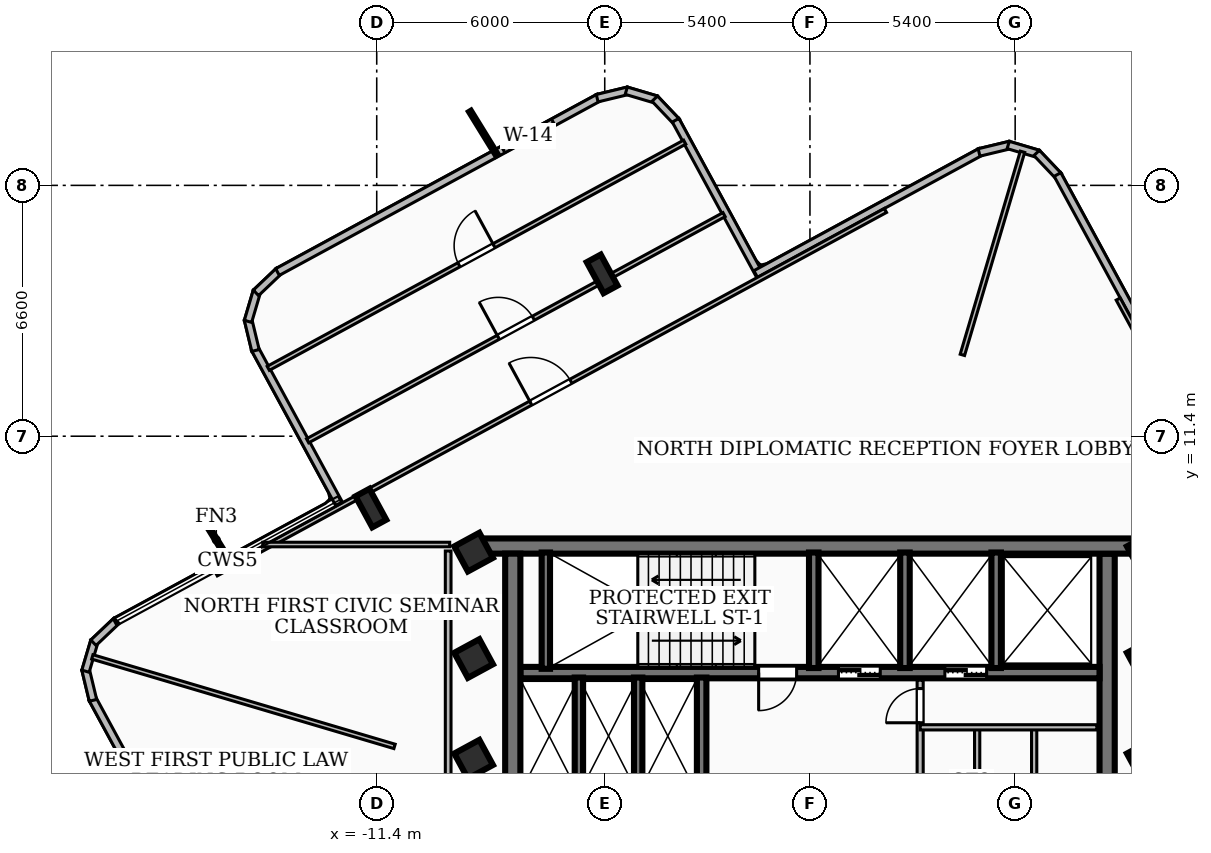
"""IFC4 building model, lengths in metres.
Left out: names, types, materials, properties, quantities, classifications, styles, units other than length and angle.
Written with IfcOpenShell. Run it as: python <this file> out.ifc"""

import sys

from ifc_helpers import new_model, si_unit, direction, frame, frame_2d, origin, origin_2d, place, context, subcontext, project, spatial, rectangle, i_section, extrude, element, fill, save


model = new_model("IFC4")
c1 = context("Model", 3, precision=1e-05, world=origin(), true_north=direction((0.0, 1.0)))
c2 = subcontext(c1, "Body", "Model", "MODEL_VIEW")
j1 = project(units=[si_unit("LENGTHUNIT", "METRE"), si_unit("PLANEANGLEUNIT", "RADIAN")], contexts=[c1])
p1 = place(None, origin())
s1 = spatial("IfcSite", under=j1, at=p1, CompositionType="ELEMENT")
p2 = place(p1, origin())
s2 = spatial("IfcBuilding", under=s1, at=p2, CompositionType="ELEMENT")
p3 = place(p2, frame((0.0, 0.0, 200.88)))
s3 = spatial("IfcBuildingStorey", under=s2, at=p3, CompositionType="ELEMENT", Elevation=200.88)
p4 = place(p3, frame((-8.78, 8.51, 0.0), z_axis=(0.0, 0.0, 1.0), x_axis=(1.0, 0.0, 0.0)))
e1 = element("IfcWall", 1, at=p4, inside=s3, PredefinedType="SHEAR", context=c2, shape_type="SweptSolid", body=[
    extrude(rectangle(XDim=17.56, YDim=0.4, at=frame_2d((8.78, 0.0))), origin(), (0.0, 0.0, 1.0), 4.06),
])
for number, where, z_axis, x_axis in (
    (2, (-7.82, 1.95, 0.0), (0.0, 0.0, 1.0), (0.0, 1.0, 0.0)),
    (3, (7.82, 8.31, 0.0), (0.0, 0.0, 1.0), (0.0, -1.0, 0.0)),
):
    element("IfcWall", number, at=place(p3, frame(where, z_axis=z_axis, x_axis=x_axis)), inside=s3, PredefinedType="SHEAR", context=c2, shape_type="SweptSolid", body=[
        extrude(rectangle(XDim=6.36, YDim=0.4, at=frame_2d((3.18, 0.0))), origin(), (0.0, 0.0, 1.0), 4.06),
    ])
p5 = place(p3, frame((7.62, 5.18, 0.0), z_axis=(0.0, 0.0, 1.0), x_axis=(-1.0, 0.0, 0.0)))
e4 = element("IfcWall", 4, at=p5, inside=s3, PredefinedType="SOLIDWALL", context=c2, shape_type="SweptSolid", body=[
    extrude(rectangle(XDim=15.24, YDim=0.3, at=frame_2d((7.62, 0.0))), origin(), (0.0, 0.0, 1.0), 4.06),
])
p6 = place(p5, frame((5.77, 0.0, 0.0)))
e5 = element("IfcOpeningElement", 5, at=p6, cuts=e4, PredefinedType="OPENING", context=c2, shape_type="SweptSolid", body=[
    extrude(rectangle(XDim=1.1, YDim=2.15, at=frame_2d((0.55, 1.075))), frame((0.0, 0.16, 0.0), z_axis=(0.0, -1.0, 0.0), x_axis=(1.0, 0.0, 0.0)), (0.0, 0.0, 1.0), 0.32),
])
p7 = place(p5, frame((2.97, 0.0, 0.0)))
e6 = element("IfcOpeningElement", 6, at=p7, cuts=e4, PredefinedType="OPENING", context=c2, shape_type="SweptSolid", body=[
    extrude(rectangle(XDim=1.1, YDim=2.15, at=frame_2d((0.55, 1.075))), frame((0.0, 0.16, 0.0), z_axis=(0.0, -1.0, 0.0), x_axis=(1.0, 0.0, 0.0)), (0.0, 0.0, 1.0), 0.32),
])
p8 = place(p5, frame((7.97, 0.0, 0.0)))
e7 = element("IfcOpeningElement", 7, at=p8, cuts=e4, PredefinedType="OPENING", context=c2, shape_type="SweptSolid", body=[
    extrude(rectangle(XDim=1.0, YDim=2.1, at=frame_2d((0.5, 1.05))), frame((0.0, 0.16, 0.0), z_axis=(0.0, -1.0, 0.0), x_axis=(1.0, 0.0, 0.0)), (0.0, 0.0, 1.0), 0.32),
])
p9 = place(p3, frame((-6.95, 5.28, 0.0), z_axis=(0.0, 0.0, 1.0), x_axis=(0.0, 1.0, 0.0)))
e8 = element("IfcWall", 8, at=p9, inside=s3, PredefinedType="SOLIDWALL", context=c2, shape_type="SweptSolid", body=[
    extrude(rectangle(XDim=3.06, YDim=0.22, at=frame_2d((1.53, 0.0))), origin(), (0.0, 0.0, 1.0), 4.06),
])
for number, where, z_axis, x_axis in (
    (9, (0.1, 5.3, 0.0), (0.0, 0.0, 1.0), (0.0, 1.0, 0.0)),
    (10, (2.5, 5.3, 0.0), (0.0, 0.0, 1.0), (0.0, 1.0, 0.0)),
    (11, (4.9, 5.3, 0.0), (0.0, 0.0, 1.0), (0.0, 1.0, 0.0)),
):
    element("IfcWall", number, at=place(p3, frame(where, z_axis=z_axis, x_axis=x_axis)), inside=s3, PredefinedType="SOLIDWALL", context=c2, shape_type="SweptSolid", body=[
        extrude(rectangle(XDim=3.04, YDim=0.25, at=frame_2d((1.52, 0.0))), origin(), (0.0, 0.0, 1.0), 4.06),
    ])
p10 = place(p3, frame((-2.85, 1.98, 0.0), z_axis=(0.0, 0.0, 1.0), x_axis=(0.0, 1.0, 0.0)))
e12 = element("IfcWall", 12, at=p10, inside=s3, PredefinedType="SOLIDWALL", context=c2, shape_type="SweptSolid", body=[
    extrude(rectangle(XDim=3.07, YDim=0.25, at=frame_2d((1.535, 0.0))), origin(), (0.0, 0.0, 1.0), 4.06),
])
for number, where, z_axis, x_axis in (
    (13, (-6.08, 1.98, 0.0), (0.0, 0.0, 1.0), (0.0, 1.0, 0.0)),
    (14, (-4.52, 1.98, 0.0), (0.0, 0.0, 1.0), (0.0, 1.0, 0.0)),
):
    element("IfcWall", number, at=place(p3, frame(where, z_axis=z_axis, x_axis=x_axis)), inside=s3, PredefinedType="SOLIDWALL", context=c2, shape_type="SweptSolid", body=[
        extrude(rectangle(XDim=3.07, YDim=0.22, at=frame_2d((1.535, 0.0))), origin(), (0.0, 0.0, 1.0), 4.06),
    ])
for number, where, z_axis, x_axis in (
    (15, (-8.85, 2.9, 0.0), (0.0, 0.0, 1.0), (0.879, 0.477, 0.0)),
    (16, (-8.85, 5.55, 0.0), (0.0, 0.0, 1.0), (0.879, 0.477, 0.0)),
    (17, (8.85, 2.9, 0.0), (0.0, 0.0, 1.0), (0.879, 0.477, 0.0)),
    (18, (8.85, 5.55, 0.0), (0.0, 0.0, 1.0), (0.879, 0.477, 0.0)),
    (19, (-8.85, 8.35, 0.0), (0.0, 0.0, 1.0), (0.879, 0.477, 0.0)),
    (20, (8.85, 8.35, 0.0), (0.0, 0.0, 1.0), (0.879, 0.477, 0.0)),
):
    element("IfcColumn", number, at=place(p3, frame(where, z_axis=z_axis, x_axis=x_axis)), inside=s3, PredefinedType="COLUMN", context=c2, shape_type="SweptSolid", body=[
        extrude(rectangle(XDim=0.75, YDim=0.75, at=origin_2d()), origin(), (0.0, 0.0, 1.0), 4.32),
    ])
for number, where, z_axis, x_axis in (
    (21, (-5.468, 15.671, 0.0), (0.0, 0.0, 1.0), (0.879, 0.477, 0.0)),
    (22, (-11.554, 9.51, 0.0), (0.0, 0.0, 1.0), (0.879, 0.477, 0.0)),
):
    element("IfcColumn", number, at=place(p3, frame(where, z_axis=z_axis, x_axis=x_axis)), inside=s3, PredefinedType="COLUMN", context=c2, shape_type="SweptSolid", body=[
        extrude(i_section(OverallWidth=0.418, OverallDepth=0.927, WebThickness=0.019, FlangeThickness=0.032, at=origin_2d()), origin(), (0.0, 0.0, 1.0), 4.32),
    ])
p11 = place(p3, frame((-6.514, -18.286, 0.0), z_axis=(0.0, 0.0, 1.0), x_axis=(-0.477173953596, 0.878808863183, 0.0)))
e23 = element("IfcWall", 23, at=p11, inside=s3, PredefinedType="SOLIDWALL", context=c2, shape_type="SweptSolid", body=[
    extrude(rectangle(XDim=25.924, YDim=0.2, at=frame_2d((12.962, 0.0))), origin(), (0.0, 0.0, 1.0), 4.06),
])
p12 = place(p11, frame((12.412, 0.0, 0.0)))
e24 = element("IfcOpeningElement", 24, at=p12, cuts=e23, PredefinedType="OPENING", context=c2, shape_type="SweptSolid", body=[
    extrude(rectangle(XDim=1.1, YDim=2.1, at=frame_2d((0.55, 1.05))), frame((0.0, 0.11, 0.0), z_axis=(0.0, -1.0, 0.0), x_axis=(1.0, 0.0, 0.0)), (0.0, 0.0, 1.0), 0.22),
])
p13 = place(p3, frame((-18.866, 4.45, 0.0), z_axis=(0.0, 0.0, 1.0), x_axis=(-0.233890685703, 0.972262900219, 0.0)))
e25 = element("IfcWall", 25, at=p13, inside=s3, PredefinedType="SOLIDWALL", context=c2, shape_type="SweptSolid", body=[
    extrude(rectangle(XDim=0.838, YDim=0.2, at=frame_2d((0.419, 0.0))), origin(), (0.0, 0.0, 1.0), 4.06),
])
p14 = place(p3, frame((-19.063, 5.217, 0.0), z_axis=(0.0, 0.0, 1.0), x_axis=(0.283866368736, 0.958863850972, 0.0)))
e26 = element("IfcWall", 26, at=p14, inside=s3, PredefinedType="SOLIDWALL", context=c2, shape_type="SweptSolid", body=[
    extrude(rectangle(XDim=0.824, YDim=0.2, at=frame_2d((0.412, 0.0))), origin(), (0.0, 0.0, 1.0), 4.06),
])
p15 = place(p3, frame((-18.854, 5.966, 0.0), z_axis=(0.0, 0.0, 1.0), x_axis=(0.725362992084, 0.688366566384, 0.0)))
e27 = element("IfcWall", 27, at=p15, inside=s3, PredefinedType="SOLIDWALL", context=c2, shape_type="SweptSolid", body=[
    extrude(rectangle(XDim=0.838, YDim=0.2, at=frame_2d((0.419, 0.0))), origin(), (0.0, 0.0, 1.0), 4.06),
])
p16 = place(p3, frame((-12.393, 9.623, 0.0), z_axis=(0.0, 0.0, 1.0), x_axis=(-0.47719284897, 0.878798603146, 0.0)))
e28 = element("IfcWall", 28, at=p16, inside=s3, PredefinedType="SOLIDWALL", context=c2, shape_type="SweptSolid", body=[
    extrude(rectangle(XDim=4.641, YDim=0.2, at=frame_2d((2.321, 0.0))), origin(), (0.0, 0.0, 1.0), 4.06),
])
p17 = place(p3, frame((-14.59, 13.656, 0.0), z_axis=(0.0, 0.0, 1.0), x_axis=(-0.233880279999, 0.972265403389, 0.0)))
e29 = element("IfcWall", 29, at=p17, inside=s3, PredefinedType="SOLIDWALL", context=c2, shape_type="SweptSolid", body=[
    extrude(rectangle(XDim=0.837, YDim=0.2, at=frame_2d((0.418, 0.0))), origin(), (0.0, 0.0, 1.0), 4.06),
])
p18 = place(p3, frame((-14.787, 14.422, 0.0), z_axis=(0.0, 0.0, 1.0), x_axis=(0.28389681639, 0.958854836586, 0.0)))
e30 = element("IfcWall", 30, at=p18, inside=s3, PredefinedType="SOLIDWALL", context=c2, shape_type="SweptSolid", body=[
    extrude(rectangle(XDim=0.825, YDim=0.2, at=frame_2d((0.412, 0.0))), origin(), (0.0, 0.0, 1.0), 4.06),
])
p19 = place(p3, frame((-14.578, 15.172, 0.0), z_axis=(0.0, 0.0, 1.0), x_axis=(0.724810143348, 0.688948659988, 0.0)))
e31 = element("IfcWall", 31, at=p19, inside=s3, PredefinedType="SOLIDWALL", context=c2, shape_type="SweptSolid", body=[
    extrude(rectangle(XDim=0.837, YDim=0.2, at=frame_2d((0.419, 0.0))), origin(), (0.0, 0.0, 1.0), 4.06),
])
p20 = place(p3, frame((-14.011, 15.72, 0.0), z_axis=(0.0, 0.0, 1.0), x_axis=(0.878829422659, 0.477136087368, 0.0)))
e32 = element("IfcWall", 32, at=p20, inside=s3, PredefinedType="SOLIDWALL", context=c2, shape_type="SweptSolid", body=[
    extrude(rectangle(XDim=9.624, YDim=0.2, at=frame_2d((4.812, 0.0))), origin(), (0.0, 0.0, 1.0), 4.06),
])
p21 = place(p20, frame((6.757, 0.0, 0.85)))
e33 = element("IfcOpeningElement", 33, at=p21, cuts=e32, PredefinedType="OPENING", context=c2, shape_type="SweptSolid", body=[
    extrude(rectangle(XDim=1.5, YDim=1.5, at=frame_2d((0.75, 0.75))), frame((0.0, 0.11, 0.0), z_axis=(0.0, -1.0, 0.0), x_axis=(1.0, 0.0, 0.0)), (0.0, 0.0, 1.0), 0.22),
])
p22 = place(p3, frame((-5.599, 20.294, 0.0), z_axis=(0.0, 0.0, 1.0), x_axis=(0.972215037407, 0.234089557733, 0.0)))
e34 = element("IfcWall", 34, at=p22, inside=s3, PredefinedType="SOLIDWALL", context=c2, shape_type="SweptSolid", body=[
    extrude(rectangle(XDim=0.837, YDim=0.2, at=frame_2d((0.419, 0.0))), origin(), (0.0, 0.0, 1.0), 4.06),
])
p23 = place(p3, frame((-4.833, 20.491, 0.0), z_axis=(0.0, 0.0, 1.0), x_axis=(0.958959195641, -0.283544107847, 0.0)))
e35 = element("IfcWall", 35, at=p23, inside=s3, PredefinedType="SOLIDWALL", context=c2, shape_type="SweptSolid", body=[
    extrude(rectangle(XDim=0.825, YDim=0.2, at=frame_2d((0.413, 0.0))), origin(), (0.0, 0.0, 1.0), 4.06),
])
p24 = place(p3, frame((-4.083, 20.282, 0.0), z_axis=(0.0, 0.0, 1.0), x_axis=(0.688366566384, -0.725362992084, 0.0)))
e36 = element("IfcWall", 36, at=p24, inside=s3, PredefinedType="SOLIDWALL", context=c2, shape_type="SweptSolid", body=[
    extrude(rectangle(XDim=0.838, YDim=0.2, at=frame_2d((0.419, 0.0))), origin(), (0.0, 0.0, 1.0), 4.06),
])
p25 = place(p3, frame((-3.535, 19.714, 0.0), z_axis=(0.0, 0.0, 1.0), x_axis=(0.477170791431, -0.878810580162, 0.0)))
e37 = element("IfcWall", 37, at=p25, inside=s3, PredefinedType="SOLIDWALL", context=c2, shape_type="SweptSolid", body=[
    extrude(rectangle(XDim=4.642, YDim=0.2, at=frame_2d((2.321, 0.0))), origin(), (0.0, 0.0, 1.0), 4.06),
])
p26 = place(p3, frame((-1.428, 15.667, 0.0), z_axis=(0.0, 0.0, 1.0), x_axis=(0.878784004338, 0.477219733162, 0.0)))
e38 = element("IfcWall", 38, at=p26, inside=s3, PredefinedType="SOLIDWALL", context=c2, shape_type="SweptSolid", body=[
    extrude(rectangle(XDim=6.741, YDim=0.2, at=frame_2d((3.371, 0.0))), origin(), (0.0, 0.0, 1.0), 4.06),
])
p27 = place(p3, frame((4.45, 18.866, 0.0), z_axis=(0.0, 0.0, 1.0), x_axis=(0.972262900219, 0.233890685703, 0.0)))
e39 = element("IfcWall", 39, at=p27, inside=s3, PredefinedType="SOLIDWALL", context=c2, shape_type="SweptSolid", body=[
    extrude(rectangle(XDim=0.838, YDim=0.2, at=frame_2d((0.419, 0.0))), origin(), (0.0, 0.0, 1.0), 4.06),
])
p28 = place(p3, frame((5.217, 19.063, 0.0), z_axis=(0.0, 0.0, 1.0), x_axis=(0.958863850972, -0.283866368736, 0.0)))
e40 = element("IfcWall", 40, at=p28, inside=s3, PredefinedType="SOLIDWALL", context=c2, shape_type="SweptSolid", body=[
    extrude(rectangle(XDim=0.824, YDim=0.2, at=frame_2d((0.412, 0.0))), origin(), (0.0, 0.0, 1.0), 4.06),
])
p29 = place(p3, frame((5.966, 18.854, 0.0), z_axis=(0.0, 0.0, 1.0), x_axis=(0.688366566384, -0.725362992084, 0.0)))
e41 = element("IfcWall", 41, at=p29, inside=s3, PredefinedType="SOLIDWALL", context=c2, shape_type="SweptSolid", body=[
    extrude(rectangle(XDim=0.838, YDim=0.2, at=frame_2d((0.419, 0.0))), origin(), (0.0, 0.0, 1.0), 4.06),
])
p30 = place(p3, frame((6.514, 18.286, 0.0), z_axis=(0.0, 0.0, 1.0), x_axis=(0.477174172682, -0.878808744224, 0.0)))
e42 = element("IfcWall", 42, at=p30, inside=s3, PredefinedType="SOLIDWALL", context=c2, shape_type="SweptSolid", body=[
    extrude(rectangle(XDim=6.742, YDim=0.2, at=frame_2d((3.371, 0.0))), origin(), (0.0, 0.0, 1.0), 4.06),
])
p31 = place(p3, frame((2.9, 2.04, 0.0), z_axis=(0.0, 0.0, 1.0), x_axis=(0.0, 1.0, 0.0)))
e43 = element("IfcWall", 43, at=p31, inside=s3, PredefinedType="PARTITIONING", context=c2, shape_type="SweptSolid", body=[
    extrude(rectangle(XDim=2.94, YDim=0.16, at=frame_2d((1.47, 0.0))), origin(), (0.0, 0.0, 1.0), 3.29),
])
p32 = place(p31, frame((1.82, 0.0, 0.0)))
e44 = element("IfcOpeningElement", 44, at=p32, cuts=e43, PredefinedType="OPENING", context=c2, shape_type="SweptSolid", body=[
    extrude(rectangle(XDim=0.9, YDim=2.06, at=frame_2d((0.45, 1.03))), frame((0.0, 0.09, 0.0), z_axis=(0.0, -1.0, 0.0), x_axis=(1.0, 0.0, 0.0)), (0.0, 0.0, 1.0), 0.18),
])
p33 = place(p3, frame((2.9, 3.74, 0.0), z_axis=(0.0, 0.0, 1.0), x_axis=(1.0, 0.0, 0.0)))
e45 = element("IfcWall", 45, at=p33, inside=s3, PredefinedType="PARTITIONING", context=c2, shape_type="SweptSolid", body=[
    extrude(rectangle(XDim=4.65, YDim=0.138, at=frame_2d((2.325, 0.0))), origin(), (0.0, 0.0, 1.0), 4.06),
])
for number, where, z_axis, x_axis in (
    (46, (4.4, 1.85, 0.0), (0.0, 0.0, 1.0), (0.0, 1.0, 0.0)),
    (47, (5.9, 1.85, 0.0), (0.0, 0.0, 1.0), (0.0, 1.0, 0.0)),
):
    element("IfcWall", number, at=place(p3, frame(where, z_axis=z_axis, x_axis=x_axis)), inside=s3, PredefinedType="PARTITIONING", context=c2, shape_type="SweptSolid", body=[
        extrude(rectangle(XDim=1.89, YDim=0.138, at=frame_2d((0.945, 0.0))), origin(), (0.0, 0.0, 1.0), 3.29),
    ])
p34 = place(p3, frame((-9.52, 1.75, 0.0), z_axis=(0.0, 0.0, 1.0), x_axis=(0.0, 1.0, 0.0)))
e48 = element("IfcWall", 48, at=p34, inside=s3, PredefinedType="PARTITIONING", context=c2, shape_type="SweptSolid", body=[
    extrude(rectangle(XDim=6.63, YDim=0.15, at=frame_2d((3.315, 0.0))), origin(), (0.0, 0.0, 1.0), 4.06),
])
p35 = place(p3, frame((-14.4, 8.55, 0.0), z_axis=(0.0, 0.0, 1.0), x_axis=(1.0, 0.0, 0.0)))
e49 = element("IfcWall", 49, at=p35, inside=s3, PredefinedType="PARTITIONING", context=c2, shape_type="SweptSolid", body=[
    extrude(rectangle(XDim=4.92, YDim=0.12, at=frame_2d((2.46, 0.0))), origin(), (0.0, 0.0, 1.0), 3.43),
])
p36 = place(p3, frame((4.011, 13.54, 0.0), z_axis=(0.0, 0.0, 1.0), x_axis=(0.283861614282, 0.958865258489, 0.0)))
e50 = element("IfcWall", 50, at=p36, inside=s3, PredefinedType="PARTITIONING", context=c2, shape_type="SweptSolid", body=[
    extrude(rectangle(XDim=5.573, YDim=0.12, at=frame_2d((2.787, 0.0))), origin(), (0.0, 0.0, 1.0), 4.06),
])
p37 = place(p3, frame((-10.931, 3.238, 0.0), z_axis=(0.0, 0.0, 1.0), x_axis=(-0.958847390296, 0.283921964845, 0.0)))
e51 = element("IfcWall", 51, at=p37, inside=s3, PredefinedType="PARTITIONING", context=c2, shape_type="SweptSolid", body=[
    extrude(rectangle(XDim=8.294, YDim=0.12, at=frame_2d((4.147, 0.0))), origin(), (0.0, 0.0, 1.0), 4.06),
])
p38 = place(p3, frame((11.905, 8.023, 0.0), z_axis=(0.0, 0.0, 1.0), x_axis=(-0.477237565532, 0.878774320315, 0.0)))
e52 = element("IfcWall", 52, at=p38, inside=s3, PredefinedType="PARTITIONING", context=c2, shape_type="SweptSolid", body=[
    extrude(rectangle(XDim=7.95, YDim=0.12, at=frame_2d((3.975, 0.0))), origin(), (0.0, 0.0, 1.0), 3.43),
])
p39 = place(p3, frame((-15.624, 7.777, 0.0), z_axis=(0.0, 0.0, 1.0), x_axis=(0.878797236248, 0.477195366242, 0.0)))
e53 = element("IfcWall", 53, at=p39, inside=s3, PredefinedType="PARTITIONING", context=c2, shape_type="SweptSolid", body=[
    extrude(rectangle(XDim=20.04, YDim=0.12, at=frame_2d((10.02, 0.0))), origin(), (0.0, 0.0, 1.0), 3.43),
])
p40 = place(p39, frame((9.419, 0.0, 0.0)))
e54 = element("IfcOpeningElement", 54, at=p40, cuts=e53, PredefinedType="OPENING", context=c2, shape_type="SweptSolid", body=[
    extrude(rectangle(XDim=1.2, YDim=2.1, at=frame_2d((0.6, 1.05))), frame((0.0, 0.07, 0.0), z_axis=(0.0, -1.0, 0.0), x_axis=(1.0, 0.0, 0.0)), (0.0, 0.0, 1.0), 0.14),
])
p41 = place(p3, frame((-13.219, 11.279, 0.0), z_axis=(0.0, 0.0, 1.0), x_axis=(0.878794087564, 0.477201164774, 0.0)))
e55 = element("IfcWall", 55, at=p41, inside=s3, PredefinedType="PARTITIONING", context=c2, shape_type="SweptSolid", body=[
    extrude(rectangle(XDim=12.47, YDim=0.12, at=frame_2d((6.235, 0.0))), origin(), (0.0, 0.0, 1.0), 3.43),
])
p42 = place(p41, frame((5.709, 0.0, 0.0)))
e56 = element("IfcOpeningElement", 56, at=p42, cuts=e55, PredefinedType="OPENING", context=c2, shape_type="SweptSolid", body=[
    extrude(rectangle(XDim=1.05, YDim=2.08, at=frame_2d((0.525, 1.04))), frame((0.0, 0.07, 0.0), z_axis=(0.0, -1.0, 0.0), x_axis=(1.0, 0.0, 0.0)), (0.0, 0.0, 1.0), 0.14),
])
p43 = place(p3, frame((-14.254, 13.186, 0.0), z_axis=(0.0, 0.0, 1.0), x_axis=(0.878776252911, 0.477234006878, 0.0)))
e57 = element("IfcWall", 57, at=p43, inside=s3, PredefinedType="PARTITIONING", context=c2, shape_type="SweptSolid", body=[
    extrude(rectangle(XDim=12.47, YDim=0.12, at=frame_2d((6.235, 0.0))), origin(), (0.0, 0.0, 1.0), 4.06),
])
p44 = place(p43, frame((5.71, 0.0, 0.0)))
e58 = element("IfcOpeningElement", 58, at=p44, cuts=e57, PredefinedType="OPENING", context=c2, shape_type="SweptSolid", body=[
    extrude(rectangle(XDim=1.05, YDim=2.08, at=frame_2d((0.525, 1.04))), frame((0.0, 0.07, 0.0), z_axis=(0.0, -1.0, 0.0), x_axis=(1.0, 0.0, 0.0)), (0.0, 0.0, 1.0), 0.14),
])
p45 = place(p21, origin())
e59 = element("IfcWindow", 59, at=p45, inside=s3, PartitioningType="SINGLE_PANEL", PredefinedType="WINDOW", context=c2, shape_type="SweptSolid", body=[
    extrude(rectangle(XDim=1.5, YDim=1.5, at=frame_2d((0.75, 0.75))), frame((0.0, 0.03, 0.0), z_axis=(0.0, -1.0, 0.0), x_axis=(1.0, 0.0, 0.0)), (0.0, 0.0, 1.0), 0.06),
])
fill(e33, e59)
p46 = place(p6, origin())
e60 = element("IfcDoor", 60, at=p46, inside=s3, OperationType="DOUBLE_DOOR_SLIDING", PredefinedType="DOOR", context=c2, shape_type="SweptSolid", body=[
    extrude(rectangle(XDim=1.1, YDim=2.15, at=frame_2d((0.55, 1.075))), frame((0.0, 0.025, 0.0), z_axis=(0.0, -1.0, 0.0), x_axis=(1.0, 0.0, 0.0)), (0.0, 0.0, 1.0), 0.05),
])
fill(e5, e60)
p47 = place(p7, origin())
e61 = element("IfcDoor", 61, at=p47, inside=s3, OperationType="DOUBLE_DOOR_SLIDING", PredefinedType="DOOR", context=c2, shape_type="SweptSolid", body=[
    extrude(rectangle(XDim=1.1, YDim=2.15, at=frame_2d((0.55, 1.075))), frame((0.0, 0.025, 0.0), z_axis=(0.0, -1.0, 0.0), x_axis=(1.0, 0.0, 0.0)), (0.0, 0.0, 1.0), 0.05),
])
fill(e6, e61)
p48 = place(p8, origin())
e62 = element("IfcDoor", 62, at=p48, inside=s3, OperationType="SINGLE_SWING_RIGHT", PredefinedType="DOOR", context=c2, shape_type="SweptSolid", body=[
    extrude(rectangle(XDim=1.0, YDim=2.1, at=frame_2d((0.5, 1.05))), frame((0.0, 0.025, 0.0), z_axis=(0.0, -1.0, 0.0), x_axis=(1.0, 0.0, 0.0)), (0.0, 0.0, 1.0), 0.05),
])
fill(e7, e62)
p49 = place(p32, origin())
e63 = element("IfcDoor", 63, at=p49, inside=s3, OperationType="SINGLE_SWING_LEFT", PredefinedType="DOOR", context=c2, shape_type="SweptSolid", body=[
    extrude(rectangle(XDim=0.9, YDim=2.06, at=frame_2d((0.45, 1.03))), frame((0.0, 0.025, 0.0), z_axis=(0.0, -1.0, 0.0), x_axis=(1.0, 0.0, 0.0)), (0.0, 0.0, 1.0), 0.05),
])
fill(e44, e63)
p50 = place(p40, origin())
e64 = element("IfcDoor", 64, at=p50, inside=s3, OperationType="SINGLE_SWING_LEFT", PredefinedType="DOOR", context=c2, shape_type="SweptSolid", body=[
    extrude(rectangle(XDim=1.2, YDim=2.1, at=frame_2d((0.6, 1.05))), frame((0.0, 0.025, 0.0), z_axis=(0.0, -1.0, 0.0), x_axis=(1.0, 0.0, 0.0)), (0.0, 0.0, 1.0), 0.05),
])
fill(e54, e64)
p51 = place(p42, origin())
e65 = element("IfcDoor", 65, at=p51, inside=s3, OperationType="SINGLE_SWING_LEFT", PredefinedType="DOOR", context=c2, shape_type="SweptSolid", body=[
    extrude(rectangle(XDim=1.05, YDim=2.08, at=frame_2d((0.525, 1.04))), frame((0.0, 0.025, 0.0), z_axis=(0.0, -1.0, 0.0), x_axis=(1.0, 0.0, 0.0)), (0.0, 0.0, 1.0), 0.05),
])
fill(e56, e65)
p52 = place(p44, origin())
e66 = element("IfcDoor", 66, at=p52, inside=s3, OperationType="SINGLE_SWING_RIGHT", PredefinedType="DOOR", context=c2, shape_type="SweptSolid", body=[
    extrude(rectangle(XDim=1.05, YDim=2.08, at=frame_2d((0.525, 1.04))), frame((0.0, 0.025, 0.0), z_axis=(0.0, -1.0, 0.0), x_axis=(1.0, 0.0, 0.0)), (0.0, 0.0, 1.0), 0.05),
])
fill(e58, e66)
save(model, sys.argv[1])
